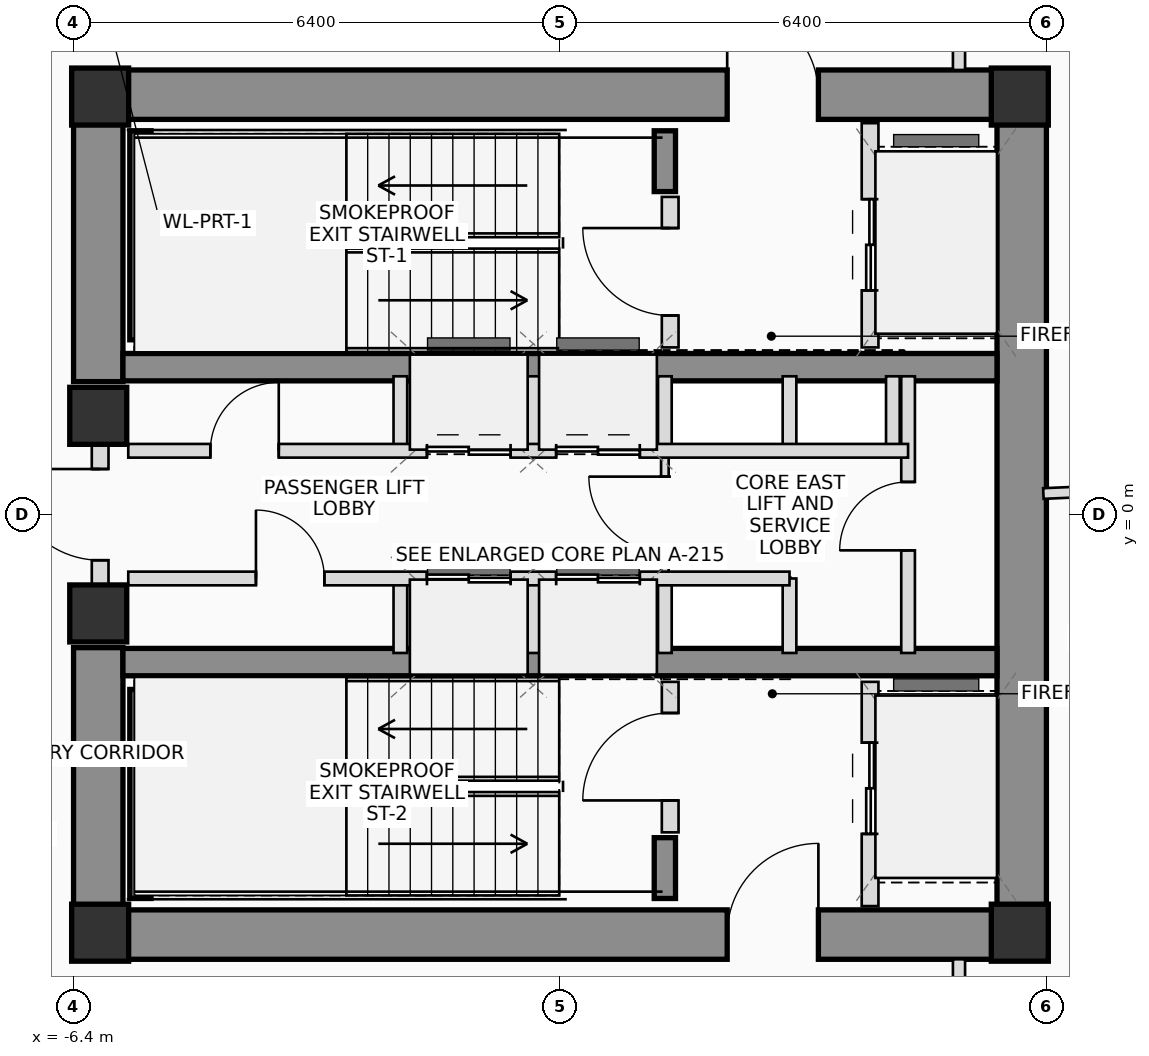
"""IFC4 building model, lengths in metres.
Left out: names, types, materials, properties, quantities, classifications, styles, units other than length and angle.
Written with IfcOpenShell. Run it as: python <this file> out.ifc"""

import sys

from ifc_helpers import new_model, si_unit, direction, frame, frame_2d, origin, origin_2d, place, context, subcontext, project, spatial, rectangle, extrude, source, transform, mapped, element, fill, save


model = new_model("IFC4")
c1 = context("Model", 3, precision=1e-05, world=origin(), true_north=direction((0.0, 1.0)))
c2 = subcontext(c1, "Body", "Model", "MODEL_VIEW")
j1 = project(units=[si_unit("LENGTHUNIT", "METRE"), si_unit("PLANEANGLEUNIT", "RADIAN")], contexts=[c1])
p1 = place(None, origin())
s1 = spatial("IfcSite", under=j1, at=p1, CompositionType="ELEMENT")
p2 = place(p1, origin())
s2 = spatial("IfcBuilding", under=s1, at=p2, CompositionType="ELEMENT")
p3 = place(p2, frame((0.0, 0.0, 165.65)))
s3 = spatial("IfcBuildingStorey", under=s2, at=p3, CompositionType="ELEMENT", Elevation=165.65)
m1 = source(origin(), c2, "Body", "SweptSolid", [
    extrude(rectangle(XDim=0.75, YDim=0.75, at=origin_2d()), origin(), (0.0, 0.0, 1.0), 3.45),
])
for number, where, z_axis, x_axis in (
    (1, (-6.05, -5.5, 0.0), (0.0, 0.0, 1.0), (1.0, 0.0, 0.0)),
    (2, (6.05, -5.5, 0.0), (0.0, 0.0, 1.0), (1.0, 0.0, 0.0)),
    (3, (6.05, 5.5, 0.0), (0.0, 0.0, 1.0), (1.0, 0.0, 0.0)),
    (4, (-6.05, 5.5, 0.0), (0.0, 0.0, 1.0), (1.0, 0.0, 0.0)),
):
    element("IfcColumn", number, at=place(p3, frame(where, z_axis=z_axis, x_axis=x_axis)), inside=s3, PredefinedType="COLUMN", context=c2, shape_type="MappedRepresentation", body=[
        mapped(m1, transform((0.0, 0.0, 0.0), scale=1.0)),
    ])
p4 = place(p3, frame((-6.4, 5.525, 0.0), z_axis=(0.0, 0.0, 1.0), x_axis=(1.0, 0.0, 0.0)))
e5 = element("IfcWall", 5, at=p4, inside=s3, PredefinedType="SHEAR", context=c2, shape_type="SweptSolid", body=[
    extrude(rectangle(XDim=12.8, YDim=0.65, at=frame_2d((6.4, 0.0))), origin(), (0.0, 0.0, 1.0), 3.45),
])
p5 = place(p4, frame((8.6, 0.0, 0.0)))
e6 = element("IfcOpeningElement", 6, at=p5, cuts=e5, PredefinedType="OPENING", context=c2, shape_type="SweptSolid", body=[
    extrude(rectangle(XDim=1.2, YDim=2.2, at=frame_2d((0.6, 1.1))), frame((0.0, 0.335, 0.0), z_axis=(0.0, -1.0, 0.0), x_axis=(1.0, 0.0, 0.0)), (0.0, 0.0, 1.0), 0.67),
])
p6 = place(p3, frame((-6.4, -5.525, 0.0), z_axis=(0.0, 0.0, 1.0), x_axis=(1.0, 0.0, 0.0)))
e7 = element("IfcWall", 7, at=p6, inside=s3, PredefinedType="SHEAR", context=c2, shape_type="SweptSolid", body=[
    extrude(rectangle(XDim=12.8, YDim=0.65, at=frame_2d((6.4, 0.0))), origin(), (0.0, 0.0, 1.0), 3.45),
])
p7 = place(p6, frame((8.6, 0.0, 0.0)))
e8 = element("IfcOpeningElement", 8, at=p7, cuts=e7, PredefinedType="OPENING", context=c2, shape_type="SweptSolid", body=[
    extrude(rectangle(XDim=1.2, YDim=2.2, at=frame_2d((0.6, 1.1))), frame((0.0, 0.335, 0.0), z_axis=(0.0, -1.0, 0.0), x_axis=(1.0, 0.0, 0.0)), (0.0, 0.0, 1.0), 0.67),
])
p8 = place(p3, frame((6.075, -5.2, 0.0), z_axis=(0.0, 0.0, 1.0), x_axis=(0.0, 1.0, 0.0)))
e9 = element("IfcWall", 9, at=p8, inside=s3, PredefinedType="SHEAR", context=c2, shape_type="SweptSolid", body=[
    extrude(rectangle(XDim=10.4, YDim=0.65, at=frame_2d((5.2, 0.0))), origin(), (0.0, 0.0, 1.0), 3.45),
])
for number, where, z_axis, x_axis in (
    (10, (-6.075, -5.2, 0.0), (0.0, 0.0, 1.0), (0.0, 1.0, 0.0)),
    (11, (-6.075, 1.75, 0.0), (0.0, 0.0, 1.0), (0.0, 1.0, 0.0)),
):
    element("IfcWall", number, at=place(p3, frame(where, z_axis=z_axis, x_axis=x_axis)), inside=s3, PredefinedType="SHEAR", context=c2, shape_type="SweptSolid", body=[
        extrude(rectangle(XDim=3.45, YDim=0.65, at=frame_2d((1.725, 0.0))), origin(), (0.0, 0.0, 1.0), 3.45),
    ])
for number, where, z_axis, x_axis in (
    (12, (-5.75, 1.94, 0.0), (0.0, 0.0, 1.0), (1.0, 0.0, 0.0)),
    (13, (-5.75, -1.94, 0.0), (0.0, 0.0, 1.0), (1.0, 0.0, 0.0)),
):
    element("IfcWall", number, at=place(p3, frame(where, z_axis=z_axis, x_axis=x_axis)), inside=s3, PredefinedType="SHEAR", context=c2, shape_type="SweptSolid", body=[
        extrude(rectangle(XDim=11.5, YDim=0.36, at=frame_2d((5.75, 0.0))), origin(), (0.0, 0.0, 1.0), 3.45),
    ])
p9 = place(p3, frame((-5.52, 2.3, 0.0), z_axis=(0.0, 0.0, 1.0), x_axis=(0.0, 1.0, 0.0)))
e14 = element("IfcWall", 14, at=p9, inside=s3, PredefinedType="SHEAR", context=c2, shape_type="SweptSolid", body=[
    extrude(rectangle(XDim=2.75, YDim=0.28, at=frame_2d((1.375, 0.0))), origin(), (0.0, 0.0, 1.0), 3.45),
])
p10 = place(p3, frame((1.38, 4.25, 0.0), z_axis=(0.0, 0.0, 1.0), x_axis=(0.0, 1.0, 0.0)))
e15 = element("IfcWall", 15, at=p10, inside=s3, PredefinedType="SHEAR", context=c2, shape_type="SweptSolid", body=[
    extrude(rectangle(XDim=0.8, YDim=0.28, at=frame_2d((0.4, 0.0))), origin(), (0.0, 0.0, 1.0), 3.45),
])
p11 = place(p3, frame((-5.52, -5.05, 0.0), z_axis=(0.0, 0.0, 1.0), x_axis=(0.0, 1.0, 0.0)))
e16 = element("IfcWall", 16, at=p11, inside=s3, PredefinedType="SHEAR", context=c2, shape_type="SweptSolid", body=[
    extrude(rectangle(XDim=2.75, YDim=0.28, at=frame_2d((1.375, 0.0))), origin(), (0.0, 0.0, 1.0), 3.45),
])
p12 = place(p3, frame((1.38, -5.05, 0.0), z_axis=(0.0, 0.0, 1.0), x_axis=(0.0, 1.0, 0.0)))
e17 = element("IfcWall", 17, at=p12, inside=s3, PredefinedType="SHEAR", context=c2, shape_type="SweptSolid", body=[
    extrude(rectangle(XDim=0.8, YDim=0.28, at=frame_2d((0.4, 0.0))), origin(), (0.0, 0.0, 1.0), 3.45),
])
for number, where, z_axis, x_axis in (
    (18, (-6.075, -1.3, 0.0), (0.0, 0.0, 1.0), (1.0, 0.0, 0.0)),
    (19, (-6.075, 1.3, 0.0), (0.0, 0.0, 1.0), (1.0, 0.0, 0.0)),
):
    element("IfcColumn", number, at=place(p3, frame(where, z_axis=z_axis, x_axis=x_axis)), inside=s3, PredefinedType="COLUMN", context=c2, shape_type="MappedRepresentation", body=[
        mapped(m1, transform((0.0, 0.0, 0.0), scale=1.0)),
    ])
p13 = place(p3, frame((-6.05, -0.95, 0.0), z_axis=(0.0, 0.0, 1.0), x_axis=(0.0, 1.0, 0.0)))
e20 = element("IfcWall", 20, at=p13, inside=s3, PredefinedType="PLUMBINGWALL", context=c2, shape_type="SweptSolid", body=[
    extrude(rectangle(XDim=1.9, YDim=0.22, at=frame_2d((0.95, 0.0))), origin(), (0.0, 0.0, 1.0), 2.23),
])
p14 = place(p13, frame((0.35, 0.0, 0.0)))
e21 = element("IfcOpeningElement", 21, at=p14, cuts=e20, PredefinedType="OPENING", context=c2, shape_type="SweptSolid", body=[
    extrude(rectangle(XDim=1.2, YDim=2.2, at=frame_2d((0.6, 1.1))), frame((0.0, 0.12, 0.0), z_axis=(0.0, -1.0, 0.0), x_axis=(1.0, 0.0, 0.0)), (0.0, 0.0, 1.0), 0.24),
])
p15 = place(p3, frame((1.45, 2.2, 0.0), z_axis=(0.0, 0.0, 1.0), x_axis=(0.0, 1.0, 0.0)))
e22 = element("IfcWall", 22, at=p15, inside=s3, PredefinedType="PLUMBINGWALL", context=c2, shape_type="SweptSolid", body=[
    extrude(rectangle(XDim=1.98, YDim=0.22, at=frame_2d((0.99, 0.0))), origin(), (0.0, 0.0, 1.0), 3.25),
])
p16 = place(p15, frame((0.42, 0.0, 0.0)))
e23 = element("IfcOpeningElement", 23, at=p16, cuts=e22, PredefinedType="OPENING", context=c2, shape_type="SweptSolid", body=[
    extrude(rectangle(XDim=1.15, YDim=2.15, at=frame_2d((0.575, 1.075))), frame((0.0, 0.12, 0.0), z_axis=(0.0, -1.0, 0.0), x_axis=(1.0, 0.0, 0.0)), (0.0, 0.0, 1.0), 0.24),
])
p17 = place(p3, frame((4.08, 2.2, 0.0), z_axis=(0.0, 0.0, 1.0), x_axis=(0.0, 1.0, 0.0)))
e24 = element("IfcWall", 24, at=p17, inside=s3, PredefinedType="PLUMBINGWALL", context=c2, shape_type="SweptSolid", body=[
    extrude(rectangle(XDim=2.95, YDim=0.22, at=frame_2d((1.475, 0.0))), origin(), (0.0, 0.0, 1.0), 3.25),
])
p18 = place(p17, frame((0.75, 0.0, 0.0)))
e25 = element("IfcOpeningElement", 25, at=p18, cuts=e24, PredefinedType="OPENING", context=c2, shape_type="SweptSolid", body=[
    extrude(rectangle(XDim=1.2, YDim=2.25, at=frame_2d((0.6, 1.125))), frame((0.0, 0.12, 0.0), z_axis=(0.0, -1.0, 0.0), x_axis=(1.0, 0.0, 0.0)), (0.0, 0.0, 1.0), 0.24),
])
p19 = place(p3, frame((1.45, -4.18, 0.0), z_axis=(0.0, 0.0, 1.0), x_axis=(0.0, 1.0, 0.0)))
e26 = element("IfcWall", 26, at=p19, inside=s3, PredefinedType="PLUMBINGWALL", context=c2, shape_type="SweptSolid", body=[
    extrude(rectangle(XDim=1.98, YDim=0.22, at=frame_2d((0.99, 0.0))), origin(), (0.0, 0.0, 1.0), 3.25),
])
p20 = place(p19, frame((0.42, 0.0, 0.0)))
e27 = element("IfcOpeningElement", 27, at=p20, cuts=e26, PredefinedType="OPENING", context=c2, shape_type="SweptSolid", body=[
    extrude(rectangle(XDim=1.15, YDim=2.15, at=frame_2d((0.575, 1.075))), frame((0.0, 0.12, 0.0), z_axis=(0.0, -1.0, 0.0), x_axis=(1.0, 0.0, 0.0)), (0.0, 0.0, 1.0), 0.24),
])
p21 = place(p3, frame((4.08, -5.15, 0.0), z_axis=(0.0, 0.0, 1.0), x_axis=(0.0, 1.0, 0.0)))
e28 = element("IfcWall", 28, at=p21, inside=s3, PredefinedType="PLUMBINGWALL", context=c2, shape_type="SweptSolid", body=[
    extrude(rectangle(XDim=2.95, YDim=0.22, at=frame_2d((1.475, 0.0))), origin(), (0.0, 0.0, 1.0), 3.25),
])
p22 = place(p21, frame((0.95, 0.0, 0.0)))
e29 = element("IfcOpeningElement", 29, at=p22, cuts=e28, PredefinedType="OPENING", context=c2, shape_type="SweptSolid", body=[
    extrude(rectangle(XDim=1.2, YDim=2.25, at=frame_2d((0.6, 1.125))), frame((0.0, 0.12, 0.0), z_axis=(0.0, -1.0, 0.0), x_axis=(1.0, 0.0, 0.0)), (0.0, 0.0, 1.0), 0.24),
])
p23 = place(p3, frame((1.38, -0.84, 0.0), z_axis=(0.0, 0.0, 1.0), x_axis=(0.0, 1.0, 0.0)))
e30 = element("IfcWall", 30, at=p23, inside=s3, PredefinedType="PARTITIONING", context=c2, shape_type="SweptSolid", body=[
    extrude(rectangle(XDim=1.68, YDim=0.1, at=frame_2d((0.84, 0.0))), origin(), (0.0, 0.0, 1.0), 3.25),
])
p24 = place(p23, frame((0.34, 0.0, 0.0)))
e31 = element("IfcOpeningElement", 31, at=p24, cuts=e30, PredefinedType="OPENING", context=c2, shape_type="SweptSolid", body=[
    extrude(rectangle(XDim=1.0, YDim=2.25, at=frame_2d((0.5, 1.125))), frame((0.0, 0.06, 0.0), z_axis=(0.0, -1.0, 0.0), x_axis=(1.0, 0.0, 0.0)), (0.0, 0.0, 1.0), 0.12),
])
for number, where, z_axis, x_axis in (
    (32, (-2.1, 0.84, 0.0), (0.0, 0.0, 1.0), (0.0, 1.0, 0.0)),
    (33, (-2.1, -1.82, 0.0), (0.0, 0.0, 1.0), (0.0, 1.0, 0.0)),
    (34, (-0.35, 0.84, 0.0), (0.0, 0.0, 1.0), (0.0, 1.0, 0.0)),
    (35, (-0.35, -1.82, 0.0), (0.0, 0.0, 1.0), (0.0, 1.0, 0.0)),
    (36, (1.38, 0.84, 0.0), (0.0, 0.0, 1.0), (0.0, 1.0, 0.0)),
    (37, (1.38, -1.82, 0.0), (0.0, 0.0, 1.0), (0.0, 1.0, 0.0)),
    (38, (3.02, 0.84, 0.0), (0.0, 0.0, 1.0), (0.0, 1.0, 0.0)),
    (39, (4.38, 0.84, 0.0), (0.0, 0.0, 1.0), (0.0, 1.0, 0.0)),
    (40, (3.02, -1.82, 0.0), (0.0, 0.0, 1.0), (0.0, 1.0, 0.0)),
):
    element("IfcWall", number, at=place(p3, frame(where, z_axis=z_axis, x_axis=x_axis)), inside=s3, PredefinedType="PLUMBINGWALL", context=c2, shape_type="SweptSolid", body=[
        extrude(rectangle(XDim=0.98, YDim=0.18, at=frame_2d((0.49, 0.0))), origin(), (0.0, 0.0, 1.0), 3.25),
    ])
p25 = place(p3, frame((4.58, -1.82, 0.0), z_axis=(0.0, 0.0, 1.0), x_axis=(0.0, 1.0, 0.0)))
e41 = element("IfcWall", 41, at=p25, inside=s3, PredefinedType="PLUMBINGWALL", context=c2, shape_type="SweptSolid", body=[
    extrude(rectangle(XDim=3.64, YDim=0.18, at=frame_2d((1.82, 0.0))), origin(), (0.0, 0.0, 1.0), 3.25),
])
p26 = place(p25, frame((1.35, 0.0, 0.0)))
e42 = element("IfcOpeningElement", 42, at=p26, cuts=e41, PredefinedType="OPENING", context=c2, shape_type="SweptSolid", body=[
    extrude(rectangle(XDim=0.9, YDim=2.05, at=frame_2d((0.45, 1.025))), frame((0.0, 0.1, 0.0), z_axis=(0.0, -1.0, 0.0), x_axis=(1.0, 0.0, 0.0)), (0.0, 0.0, 1.0), 0.2),
])
p27 = place(p3, frame((-5.68, 0.84, 0.0), z_axis=(0.0, 0.0, 1.0), x_axis=(1.0, 0.0, 0.0)))
e43 = element("IfcWall", 43, at=p27, inside=s3, PredefinedType="PLUMBINGWALL", context=c2, shape_type="SweptSolid", body=[
    extrude(rectangle(XDim=10.26, YDim=0.18, at=frame_2d((5.13, 0.0))), origin(), (0.0, 0.0, 1.0), 3.25),
])
p28 = place(p27, frame((1.08, 0.0, 0.0)))
e44 = element("IfcOpeningElement", 44, at=p28, cuts=e43, PredefinedType="OPENING", context=c2, shape_type="SweptSolid", body=[
    extrude(rectangle(XDim=0.9, YDim=2.05, at=frame_2d((0.45, 1.025))), frame((0.0, 0.1, 0.0), z_axis=(0.0, -1.0, 0.0), x_axis=(1.0, 0.0, 0.0)), (0.0, 0.0, 1.0), 0.2),
])
p29 = place(p27, frame((3.93, 0.0, 0.0)))
e45 = element("IfcOpeningElement", 45, at=p29, cuts=e43, PredefinedType="OPENING", context=c2, shape_type="SweptSolid", body=[
    extrude(rectangle(XDim=1.1, YDim=2.2, at=frame_2d((0.55, 1.1))), frame((0.0, 0.1, 0.0), z_axis=(0.0, -1.0, 0.0), x_axis=(1.0, 0.0, 0.0)), (0.0, 0.0, 1.0), 0.2),
])
p30 = place(p27, frame((5.63, 0.0, 0.0)))
e46 = element("IfcOpeningElement", 46, at=p30, cuts=e43, PredefinedType="OPENING", context=c2, shape_type="SweptSolid", body=[
    extrude(rectangle(XDim=1.1, YDim=2.2, at=frame_2d((0.55, 1.1))), frame((0.0, 0.1, 0.0), z_axis=(0.0, -1.0, 0.0), x_axis=(1.0, 0.0, 0.0)), (0.0, 0.0, 1.0), 0.2),
])
p31 = place(p3, frame((-5.68, -0.84, 0.0), z_axis=(0.0, 0.0, 1.0), x_axis=(1.0, 0.0, 0.0)))
e47 = element("IfcWall", 47, at=p31, inside=s3, PredefinedType="PLUMBINGWALL", context=c2, shape_type="SweptSolid", body=[
    extrude(rectangle(XDim=8.7, YDim=0.18, at=frame_2d((4.35, 0.0))), origin(), (0.0, 0.0, 1.0), 3.25),
])
p32 = place(p31, frame((1.68, 0.0, 0.0)))
e48 = element("IfcOpeningElement", 48, at=p32, cuts=e47, PredefinedType="OPENING", context=c2, shape_type="SweptSolid", body=[
    extrude(rectangle(XDim=0.9, YDim=2.05, at=frame_2d((0.45, 1.025))), frame((0.0, 0.1, 0.0), z_axis=(0.0, -1.0, 0.0), x_axis=(1.0, 0.0, 0.0)), (0.0, 0.0, 1.0), 0.2),
])
p33 = place(p31, frame((3.93, 0.0, 0.0)))
e49 = element("IfcOpeningElement", 49, at=p33, cuts=e47, PredefinedType="OPENING", context=c2, shape_type="SweptSolid", body=[
    extrude(rectangle(XDim=1.1, YDim=2.2, at=frame_2d((0.55, 1.1))), frame((0.0, 0.1, 0.0), z_axis=(0.0, -1.0, 0.0), x_axis=(1.0, 0.0, 0.0)), (0.0, 0.0, 1.0), 0.2),
])
p34 = place(p31, frame((5.63, 0.0, 0.0)))
e50 = element("IfcOpeningElement", 50, at=p34, cuts=e47, PredefinedType="OPENING", context=c2, shape_type="SweptSolid", body=[
    extrude(rectangle(XDim=1.1, YDim=2.2, at=frame_2d((0.55, 1.1))), frame((0.0, 0.1, 0.0), z_axis=(0.0, -1.0, 0.0), x_axis=(1.0, 0.0, 0.0)), (0.0, 0.0, 1.0), 0.2),
])
for number, where, z_axis, x_axis in (
    (51, (5.25, 7.5, 0.0), (0.0, 0.0, 1.0), (0.0, -1.0, 0.0)),
    (52, (5.25, -5.85, 0.0), (0.0, 0.0, 1.0), (0.0, -1.0, 0.0)),
):
    element("IfcWall", number, at=place(p3, frame(where, z_axis=z_axis, x_axis=x_axis)), inside=s3, PredefinedType="PARTITIONING", context=c2, shape_type="SweptSolid", body=[
        extrude(rectangle(XDim=1.65, YDim=0.16, at=frame_2d((0.825, 0.0))), origin(), (0.0, 0.0, 1.0), 3.25),
    ])
p35 = place(p3, frame((6.36, 0.278, 0.0), z_axis=(0.0, 0.0, 1.0), x_axis=(0.999047543566, 0.043634913719, 0.0)))
e53 = element("IfcWall", 53, at=p35, inside=s3, PredefinedType="PARTITIONING", context=c2, shape_type="SweptSolid", body=[
    extrude(rectangle(XDim=7.503, YDim=0.14, at=frame_2d((3.751, 0.0))), origin(), (0.0, 0.0, 1.0), 2.605),
])
p36 = place(p5, origin())
e54 = element("IfcDoor", 54, at=p36, inside=s3, OperationType="SINGLE_SWING_LEFT", PredefinedType="DOOR", context=c2, shape_type="SweptSolid", body=[
    extrude(rectangle(XDim=1.2, YDim=2.2, at=frame_2d((0.6, 1.1))), frame((0.0, 0.025, 0.0), z_axis=(0.0, -1.0, 0.0), x_axis=(1.0, 0.0, 0.0)), (0.0, 0.0, 1.0), 0.05),
])
fill(e6, e54)
p37 = place(p7, origin())
e55 = element("IfcDoor", 55, at=p37, inside=s3, OperationType="SINGLE_SWING_RIGHT", PredefinedType="DOOR", context=c2, shape_type="SweptSolid", body=[
    extrude(rectangle(XDim=1.2, YDim=2.2, at=frame_2d((0.6, 1.1))), frame((0.0, 0.025, 0.0), z_axis=(0.0, -1.0, 0.0), x_axis=(1.0, 0.0, 0.0)), (0.0, 0.0, 1.0), 0.05),
])
fill(e8, e55)
p38 = place(p14, origin())
e56 = element("IfcDoor", 56, at=p38, inside=s3, OperationType="SINGLE_SWING_RIGHT", PredefinedType="DOOR", context=c2, shape_type="SweptSolid", body=[
    extrude(rectangle(XDim=1.2, YDim=2.2, at=frame_2d((0.6, 1.1))), frame((0.0, 0.025, 0.0), z_axis=(0.0, -1.0, 0.0), x_axis=(1.0, 0.0, 0.0)), (0.0, 0.0, 1.0), 0.05),
])
fill(e21, e56)
p39 = place(p16, origin())
e57 = element("IfcDoor", 57, at=p39, inside=s3, OperationType="SINGLE_SWING_RIGHT", PredefinedType="DOOR", context=c2, shape_type="SweptSolid", body=[
    extrude(rectangle(XDim=1.15, YDim=2.15, at=frame_2d((0.575, 1.075))), frame((0.0, 0.025, 0.0), z_axis=(0.0, -1.0, 0.0), x_axis=(1.0, 0.0, 0.0)), (0.0, 0.0, 1.0), 0.05),
])
fill(e23, e57)
p40 = place(p18, origin())
e58 = element("IfcDoor", 58, at=p40, inside=s3, OperationType="DOUBLE_DOOR_SLIDING", PredefinedType="DOOR", context=c2, shape_type="SweptSolid", body=[
    extrude(rectangle(XDim=1.2, YDim=2.25, at=frame_2d((0.6, 1.125))), frame((0.0, 0.025, 0.0), z_axis=(0.0, -1.0, 0.0), x_axis=(1.0, 0.0, 0.0)), (0.0, 0.0, 1.0), 0.05),
])
fill(e25, e58)
p41 = place(p20, origin())
e59 = element("IfcDoor", 59, at=p41, inside=s3, OperationType="SINGLE_SWING_LEFT", PredefinedType="DOOR", context=c2, shape_type="SweptSolid", body=[
    extrude(rectangle(XDim=1.15, YDim=2.15, at=frame_2d((0.575, 1.075))), frame((0.0, 0.025, 0.0), z_axis=(0.0, -1.0, 0.0), x_axis=(1.0, 0.0, 0.0)), (0.0, 0.0, 1.0), 0.05),
])
fill(e27, e59)
p42 = place(p22, origin())
e60 = element("IfcDoor", 60, at=p42, inside=s3, OperationType="DOUBLE_DOOR_SLIDING", PredefinedType="DOOR", context=c2, shape_type="SweptSolid", body=[
    extrude(rectangle(XDim=1.2, YDim=2.25, at=frame_2d((0.6, 1.125))), frame((0.0, 0.025, 0.0), z_axis=(0.0, -1.0, 0.0), x_axis=(1.0, 0.0, 0.0)), (0.0, 0.0, 1.0), 0.05),
])
fill(e29, e60)
p43 = place(p24, origin())
e61 = element("IfcDoor", 61, at=p43, inside=s3, OperationType="SINGLE_SWING_RIGHT", PredefinedType="DOOR", context=c2, shape_type="SweptSolid", body=[
    extrude(rectangle(XDim=1.0, YDim=2.25, at=frame_2d((0.5, 1.125))), frame((0.0, 0.025, 0.0), z_axis=(0.0, -1.0, 0.0), x_axis=(1.0, 0.0, 0.0)), (0.0, 0.0, 1.0), 0.05),
])
fill(e31, e61)
p44 = place(p26, origin())
e62 = element("IfcDoor", 62, at=p44, inside=s3, OperationType="SINGLE_SWING_LEFT", PredefinedType="DOOR", context=c2, shape_type="SweptSolid", body=[
    extrude(rectangle(XDim=0.9, YDim=2.05, at=frame_2d((0.45, 1.025))), frame((0.0, 0.025, 0.0), z_axis=(0.0, -1.0, 0.0), x_axis=(1.0, 0.0, 0.0)), (0.0, 0.0, 1.0), 0.05),
])
fill(e42, e62)
p45 = place(p28, origin())
e63 = element("IfcDoor", 63, at=p45, inside=s3, OperationType="SINGLE_SWING_RIGHT", PredefinedType="DOOR", context=c2, shape_type="SweptSolid", body=[
    extrude(rectangle(XDim=0.9, YDim=2.05, at=frame_2d((0.45, 1.025))), frame((0.0, 0.025, 0.0), z_axis=(0.0, -1.0, 0.0), x_axis=(1.0, 0.0, 0.0)), (0.0, 0.0, 1.0), 0.05),
])
fill(e44, e63)
p46 = place(p29, origin())
e64 = element("IfcDoor", 64, at=p46, inside=s3, OperationType="DOUBLE_DOOR_SLIDING", PredefinedType="DOOR", context=c2, shape_type="SweptSolid", body=[
    extrude(rectangle(XDim=1.1, YDim=2.2, at=frame_2d((0.55, 1.1))), frame((0.0, 0.025, 0.0), z_axis=(0.0, -1.0, 0.0), x_axis=(1.0, 0.0, 0.0)), (0.0, 0.0, 1.0), 0.05),
])
fill(e45, e64)
p47 = place(p30, origin())
e65 = element("IfcDoor", 65, at=p47, inside=s3, OperationType="DOUBLE_DOOR_SLIDING", PredefinedType="DOOR", context=c2, shape_type="SweptSolid", body=[
    extrude(rectangle(XDim=1.1, YDim=2.2, at=frame_2d((0.55, 1.1))), frame((0.0, 0.025, 0.0), z_axis=(0.0, -1.0, 0.0), x_axis=(1.0, 0.0, 0.0)), (0.0, 0.0, 1.0), 0.05),
])
fill(e46, e65)
p48 = place(p32, origin())
e66 = element("IfcDoor", 66, at=p48, inside=s3, OperationType="SINGLE_SWING_LEFT", PredefinedType="DOOR", context=c2, shape_type="SweptSolid", body=[
    extrude(rectangle(XDim=0.9, YDim=2.05, at=frame_2d((0.45, 1.025))), frame((0.0, 0.025, 0.0), z_axis=(0.0, -1.0, 0.0), x_axis=(1.0, 0.0, 0.0)), (0.0, 0.0, 1.0), 0.05),
])
fill(e48, e66)
p49 = place(p33, origin())
e67 = element("IfcDoor", 67, at=p49, inside=s3, OperationType="DOUBLE_DOOR_SLIDING", PredefinedType="DOOR", context=c2, shape_type="SweptSolid", body=[
    extrude(rectangle(XDim=1.1, YDim=2.2, at=frame_2d((0.55, 1.1))), frame((0.0, 0.025, 0.0), z_axis=(0.0, -1.0, 0.0), x_axis=(1.0, 0.0, 0.0)), (0.0, 0.0, 1.0), 0.05),
])
fill(e49, e67)
p50 = place(p34, origin())
e68 = element("IfcDoor", 68, at=p50, inside=s3, OperationType="DOUBLE_DOOR_SLIDING", PredefinedType="DOOR", context=c2, shape_type="SweptSolid", body=[
    extrude(rectangle(XDim=1.1, YDim=2.2, at=frame_2d((0.55, 1.1))), frame((0.0, 0.025, 0.0), z_axis=(0.0, -1.0, 0.0), x_axis=(1.0, 0.0, 0.0)), (0.0, 0.0, 1.0), 0.05),
])
fill(e50, e68)
save(model, sys.argv[1])
